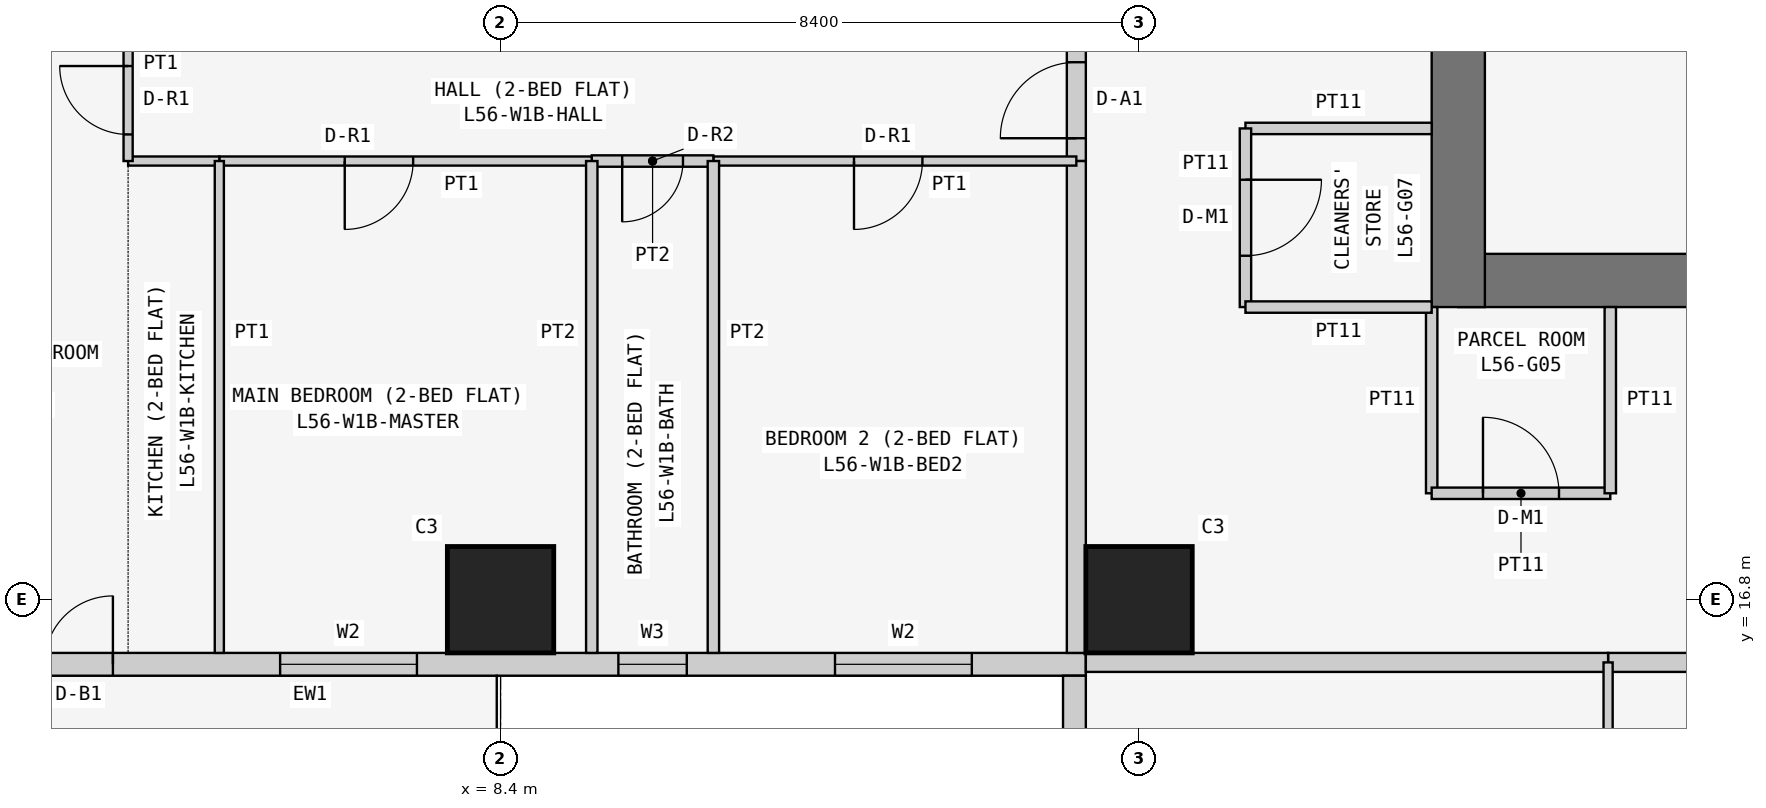
"""IFC4 building model, lengths in metres.
Left out: names, types, materials, properties, quantities, classifications, styles, units other than length and angle.
Written with IfcOpenShell. Run it as: python <this file> out.ifc"""

import sys

from ifc_helpers import new_model, si_unit, direction, frame, frame_2d, origin, origin_2d, place, context, subcontext, project, spatial, rectangle, extrude, element, fill, save


model = new_model("IFC4")
c1 = context("Model", 3, precision=1e-05, world=origin(), true_north=direction((0.0, 1.0)))
c2 = subcontext(c1, "Body", "Model", "MODEL_VIEW")
j1 = project(units=[si_unit("LENGTHUNIT", "METRE"), si_unit("PLANEANGLEUNIT", "RADIAN")], contexts=[c1])
p1 = place(None, origin())
s1 = spatial("IfcSite", under=j1, at=p1, CompositionType="ELEMENT")
p2 = place(p1, origin())
s2 = spatial("IfcBuilding", under=s1, at=p2, CompositionType="ELEMENT")
p3 = place(p2, frame((0.0, 0.0, 215.7)))
s3 = spatial("IfcBuildingStorey", under=s2, at=p3, CompositionType="ELEMENT", Elevation=215.7)
for number, where, z_axis, x_axis in (
    (1, (8.4, 16.8, 0.0), (0.0, 0.0, 1.0), (1.0, 0.0, 0.0)),
    (2, (16.8, 16.8, 0.0), (0.0, 0.0, 1.0), (1.0, 0.0, 0.0)),
):
    element("IfcColumn", number, at=place(p3, frame(where, z_axis=z_axis, x_axis=x_axis)), inside=s3, PredefinedType="COLUMN", context=c2, shape_type="SweptSolid", body=[
        extrude(rectangle(XDim=1.4, YDim=1.4, at=origin_2d()), origin(), (0.0, 0.0, 1.0), 3.6),
    ])
p4 = place(p3, frame((21.0, 21.0, 0.0), z_axis=(0.0, 0.0, 1.0), x_axis=(1.0, 0.0, 0.0)))
e3 = element("IfcWall", 3, at=p4, inside=s3, PredefinedType="SHEAR", context=c2, shape_type="SweptSolid", body=[
    extrude(rectangle(XDim=17.15, YDim=0.7, at=frame_2d((8.575, 0.0))), origin(), (0.0, 0.0, 1.0), 3.6),
])
p5 = place(p3, frame((21.0, 37.8, 0.0), z_axis=(0.0, 0.0, 1.0), x_axis=(0.0, -1.0, 0.0)))
e4 = element("IfcWall", 4, at=p5, inside=s3, PredefinedType="SHEAR", context=c2, shape_type="SweptSolid", body=[
    extrude(rectangle(XDim=17.15, YDim=0.7, at=frame_2d((8.575, 0.0))), origin(), (0.0, 0.0, 1.0), 3.6),
])
p6 = place(p5, frame((5.4, 0.0, 0.0)))
e5 = element("IfcOpeningElement", 5, at=p6, cuts=e4, PredefinedType="OPENING", context=c2, shape_type="SweptSolid", body=[
    extrude(rectangle(XDim=1.2, YDim=2.1, at=frame_2d((0.6, 1.05))), frame((0.0, 0.36, 0.0), z_axis=(0.0, -1.0, 0.0), x_axis=(1.0, 0.0, 0.0)), (0.0, 0.0, 1.0), 0.72),
])
p7 = place(p3, frame((0.4, 15.95, 0.0), z_axis=(0.0, 0.0, 1.0), x_axis=(1.0, 0.0, 0.0)))
e6 = element("IfcWall", 6, at=p7, inside=s3, PredefinedType="SOLIDWALL", context=c2, shape_type="SweptSolid", body=[
    extrude(rectangle(XDim=15.7, YDim=0.3, at=frame_2d((7.85, 0.0))), origin(), (0.0, 0.0, 1.0), 3.45),
])
p8 = place(p7, frame((12.4, 0.0, 0.9)))
e7 = element("IfcOpeningElement", 7, at=p8, cuts=e6, PredefinedType="OPENING", context=c2, shape_type="SweptSolid", body=[
    extrude(rectangle(XDim=1.8, YDim=1.5, at=frame_2d((0.9, 0.75))), frame((0.0, 0.16, 0.0), z_axis=(0.0, -1.0, 0.0), x_axis=(1.0, 0.0, 0.0)), (0.0, 0.0, 1.0), 0.32),
])
p9 = place(p7, frame((9.55, 0.0, 1.5)))
e8 = element("IfcOpeningElement", 8, at=p9, cuts=e6, PredefinedType="OPENING", context=c2, shape_type="SweptSolid", body=[
    extrude(rectangle(XDim=0.9, YDim=0.7, at=frame_2d((0.45, 0.35))), frame((0.0, 0.16, 0.0), z_axis=(0.0, -1.0, 0.0), x_axis=(1.0, 0.0, 0.0)), (0.0, 0.0, 1.0), 0.32),
])
p10 = place(p7, frame((5.1, 0.0, 0.9)))
e9 = element("IfcOpeningElement", 9, at=p10, cuts=e6, PredefinedType="OPENING", context=c2, shape_type="SweptSolid", body=[
    extrude(rectangle(XDim=1.8, YDim=1.5, at=frame_2d((0.9, 0.75))), frame((0.0, 0.16, 0.0), z_axis=(0.0, -1.0, 0.0), x_axis=(1.0, 0.0, 0.0)), (0.0, 0.0, 1.0), 0.32),
])
p11 = place(p7, frame((2.0, 0.0, 0.0)))
e10 = element("IfcOpeningElement", 10, at=p11, cuts=e6, PredefinedType="OPENING", context=c2, shape_type="SweptSolid", body=[
    extrude(rectangle(XDim=0.9, YDim=2.4, at=frame_2d((0.45, 1.2))), frame((0.0, 0.16, 0.0), z_axis=(0.0, -1.0, 0.0), x_axis=(1.0, 0.0, 0.0)), (0.0, 0.0, 1.0), 0.32),
])
p12 = place(p7, frame((0.7, 0.0, 0.9)))
e11 = element("IfcOpeningElement", 11, at=p12, cuts=e6, PredefinedType="OPENING", context=c2, shape_type="SweptSolid", body=[
    extrude(rectangle(XDim=1.2, YDim=1.5, at=frame_2d((0.6, 0.75))), frame((0.0, 0.16, 0.0), z_axis=(0.0, -1.0, 0.0), x_axis=(1.0, 0.0, 0.0)), (0.0, 0.0, 1.0), 0.32),
])
p13 = place(p3, frame((15.95, 15.8, 0.0), z_axis=(0.0, 0.0, 1.0), x_axis=(0.0, -1.0, 0.0)))
e12 = element("IfcWall", 12, at=p13, inside=s3, PredefinedType="SOLIDWALL", context=c2, shape_type="SweptSolid", body=[
    extrude(rectangle(XDim=7.0, YDim=0.3, at=frame_2d((3.5, 0.0))), origin(), (0.0, 0.0, 1.0), 3.45),
])
p14 = place(p13, frame((1.5, 0.0, 0.9)))
e13 = element("IfcOpeningElement", 13, at=p14, cuts=e12, PredefinedType="OPENING", context=c2, shape_type="SweptSolid", body=[
    extrude(rectangle(XDim=2.4, YDim=1.5, at=frame_2d((1.2, 0.75))), frame((0.0, 0.16, 0.0), z_axis=(0.0, -1.0, 0.0), x_axis=(1.0, 0.0, 0.0)), (0.0, 0.0, 1.0), 0.32),
])
p15 = place(p13, frame((5.05, 0.0, 0.9)))
e14 = element("IfcOpeningElement", 14, at=p15, cuts=e12, PredefinedType="OPENING", context=c2, shape_type="SweptSolid", body=[
    extrude(rectangle(XDim=1.2, YDim=1.5, at=frame_2d((0.6, 0.75))), frame((0.0, 0.16, 0.0), z_axis=(0.0, -1.0, 0.0), x_axis=(1.0, 0.0, 0.0)), (0.0, 0.0, 1.0), 0.32),
])
p16 = place(p3, frame((20.65, 20.65, 0.0), z_axis=(0.0, 0.0, 1.0), x_axis=(0.0, -1.0, 0.0)))
e15 = element("IfcWall", 15, at=p16, inside=s3, PredefinedType="PARTITIONING", context=c2, shape_type="SweptSolid", body=[
    extrude(rectangle(XDim=2.45, YDim=0.15, at=frame_2d((1.225, 0.0))), origin(), (0.0, 0.0, 1.0), 3.45),
])
p17 = place(p3, frame((20.65, 18.2, 0.0), z_axis=(0.0, 0.0, 1.0), x_axis=(1.0, 0.0, 0.0)))
e16 = element("IfcWall", 16, at=p17, inside=s3, PredefinedType="PARTITIONING", context=c2, shape_type="SweptSolid", body=[
    extrude(rectangle(XDim=2.35, YDim=0.15, at=frame_2d((1.175, 0.0))), origin(), (0.0, 0.0, 1.0), 3.45),
])
p18 = place(p17, frame((0.675, 0.0, 0.0)))
e17 = element("IfcOpeningElement", 17, at=p18, cuts=e16, PredefinedType="OPENING", context=c2, shape_type="SweptSolid", body=[
    extrude(rectangle(XDim=1.0, YDim=2.1, at=frame_2d((0.5, 1.05))), frame((0.0, 0.085, 0.0), z_axis=(0.0, -1.0, 0.0), x_axis=(1.0, 0.0, 0.0)), (0.0, 0.0, 1.0), 0.17),
])
for number, where, z_axis, x_axis in (
    (18, (23.0, 18.2, 0.0), (0.0, 0.0, 1.0), (0.0, 1.0, 0.0)),
    (19, (20.65, 23.0, 0.0), (0.0, 0.0, 1.0), (-1.0, 0.0, 0.0)),
):
    element("IfcWall", number, at=place(p3, frame(where, z_axis=z_axis, x_axis=x_axis)), inside=s3, PredefinedType="PARTITIONING", context=c2, shape_type="SweptSolid", body=[
        extrude(rectangle(XDim=2.45, YDim=0.15, at=frame_2d((1.225, 0.0))), origin(), (0.0, 0.0, 1.0), 3.45),
    ])
p19 = place(p3, frame((18.2, 23.0, 0.0), z_axis=(0.0, 0.0, 1.0), x_axis=(0.0, -1.0, 0.0)))
e20 = element("IfcWall", 20, at=p19, inside=s3, PredefinedType="PARTITIONING", context=c2, shape_type="SweptSolid", body=[
    extrude(rectangle(XDim=2.35, YDim=0.15, at=frame_2d((1.175, 0.0))), origin(), (0.0, 0.0, 1.0), 3.45),
])
p20 = place(p19, frame((0.675, 0.0, 0.0)))
e21 = element("IfcOpeningElement", 21, at=p20, cuts=e20, PredefinedType="OPENING", context=c2, shape_type="SweptSolid", body=[
    extrude(rectangle(XDim=1.0, YDim=2.1, at=frame_2d((0.5, 1.05))), frame((0.0, 0.085, 0.0), z_axis=(0.0, -1.0, 0.0), x_axis=(1.0, 0.0, 0.0)), (0.0, 0.0, 1.0), 0.17),
])
p21 = place(p3, frame((18.2, 20.65, 0.0), z_axis=(0.0, 0.0, 1.0), x_axis=(1.0, 0.0, 0.0)))
e22 = element("IfcWall", 22, at=p21, inside=s3, PredefinedType="PARTITIONING", context=c2, shape_type="SweptSolid", body=[
    extrude(rectangle(XDim=2.45, YDim=0.15, at=frame_2d((1.225, 0.0))), origin(), (0.0, 0.0, 1.0), 3.45),
])
p22 = place(p3, frame((29.4, 15.975, 0.0), z_axis=(0.0, 0.0, 1.0), x_axis=(-1.0, 0.0, 0.0)))
e23 = element("IfcWall", 23, at=p22, inside=s3, PredefinedType="PARTITIONING", context=c2, shape_type="SweptSolid", body=[
    extrude(rectangle(XDim=6.429, YDim=0.25, at=frame_2d((3.214, 0.0))), origin(), (0.0, 0.0, 1.0), 3.45),
])
p23 = place(p22, frame((0.5, 0.0, 0.0)))
e24 = element("IfcOpeningElement", 24, at=p23, cuts=e23, PredefinedType="OPENING", context=c2, shape_type="SweptSolid", body=[
    extrude(rectangle(XDim=1.0, YDim=2.1, at=frame_2d((0.5, 1.05))), frame((0.0, 0.135, 0.0), z_axis=(0.0, -1.0, 0.0), x_axis=(1.0, 0.0, 0.0)), (0.0, 0.0, 1.0), 0.27),
])
p24 = place(p3, frame((22.971, 15.975, 0.0), z_axis=(0.0, 0.0, 1.0), x_axis=(-1.0, 0.0, 0.0)))
e25 = element("IfcWall", 25, at=p24, inside=s3, PredefinedType="PARTITIONING", context=c2, shape_type="SweptSolid", body=[
    extrude(rectangle(XDim=6.871, YDim=0.25, at=frame_2d((3.436, 0.0))), origin(), (0.0, 0.0, 1.0), 3.45),
])
p25 = place(p3, frame((15.975, 22.571, 0.0), z_axis=(0.0, 0.0, 1.0), x_axis=(0.0, 1.0, 0.0)))
e26 = element("IfcWall", 26, at=p25, inside=s3, PredefinedType="PARTITIONING", context=c2, shape_type="SweptSolid", body=[
    extrude(rectangle(XDim=1.6, YDim=0.25, at=frame_2d((0.8, 0.0))), origin(), (0.0, 0.0, 1.0), 3.45),
])
p26 = place(p25, frame((0.3, 0.0, 0.0)))
e27 = element("IfcOpeningElement", 27, at=p26, cuts=e26, PredefinedType="OPENING", context=c2, shape_type="SweptSolid", body=[
    extrude(rectangle(XDim=1.0, YDim=2.1, at=frame_2d((0.5, 1.05))), frame((0.0, 0.135, 0.0), z_axis=(0.0, -1.0, 0.0), x_axis=(1.0, 0.0, 0.0)), (0.0, 0.0, 1.0), 0.27),
])
p27 = place(p3, frame((15.975, 16.1, 0.0), z_axis=(0.0, 0.0, 1.0), x_axis=(0.0, 1.0, 0.0)))
e28 = element("IfcWall", 28, at=p27, inside=s3, PredefinedType="PARTITIONING", context=c2, shape_type="SweptSolid", body=[
    extrude(rectangle(XDim=6.471, YDim=0.25, at=frame_2d((3.235, 0.0))), origin(), (0.0, 0.0, 1.0), 3.45),
])
p28 = place(p3, frame((22.971, 11.0, 0.0), z_axis=(0.0, 0.0, 1.0), x_axis=(0.0, 1.0, 0.0)))
e29 = element("IfcWall", 29, at=p28, inside=s3, PredefinedType="PARTITIONING", context=c2, shape_type="SweptSolid", body=[
    extrude(rectangle(XDim=4.975, YDim=0.12, at=frame_2d((2.488, 0.0))), origin(), (0.0, 0.0, 1.0), 3.45),
])
p29 = place(p28, frame((1.85, 0.0, 0.0)))
e30 = element("IfcOpeningElement", 30, at=p29, cuts=e29, PredefinedType="OPENING", context=c2, shape_type="SweptSolid", body=[
    extrude(rectangle(XDim=0.9, YDim=2.1, at=frame_2d((0.45, 1.05))), frame((0.0, 0.07, 0.0), z_axis=(0.0, -1.0, 0.0), x_axis=(1.0, 0.0, 0.0)), (0.0, 0.0, 1.0), 0.14),
])
p30 = place(p3, frame((11.2, 22.571, 0.0), z_axis=(0.0, 0.0, 1.0), x_axis=(1.0, 0.0, 0.0)))
e31 = element("IfcWall", 31, at=p30, inside=s3, PredefinedType="PARTITIONING", context=c2, shape_type="SweptSolid", body=[
    extrude(rectangle(XDim=4.775, YDim=0.12, at=frame_2d((2.388, 0.0))), origin(), (0.0, 0.0, 1.0), 3.45),
])
p31 = place(p30, frame((1.85, 0.0, 0.0)))
e32 = element("IfcOpeningElement", 32, at=p31, cuts=e31, PredefinedType="OPENING", context=c2, shape_type="SweptSolid", body=[
    extrude(rectangle(XDim=0.9, YDim=2.1, at=frame_2d((0.45, 1.05))), frame((0.0, 0.07, 0.0), z_axis=(0.0, -1.0, 0.0), x_axis=(1.0, 0.0, 0.0)), (0.0, 0.0, 1.0), 0.14),
])
p32 = place(p3, frame((9.6, 22.571, 0.0), z_axis=(0.0, 0.0, 1.0), x_axis=(1.0, 0.0, 0.0)))
e33 = element("IfcWall", 33, at=p32, inside=s3, PredefinedType="PARTITIONING", context=c2, shape_type="SweptSolid", body=[
    extrude(rectangle(XDim=1.6, YDim=0.15, at=frame_2d((0.8, 0.0))), origin(), (0.0, 0.0, 1.0), 3.45),
])
p33 = place(p32, frame((0.4, 0.0, 0.0)))
e34 = element("IfcOpeningElement", 34, at=p33, cuts=e33, PredefinedType="OPENING", context=c2, shape_type="SweptSolid", body=[
    extrude(rectangle(XDim=0.8, YDim=2.1, at=frame_2d((0.4, 1.05))), frame((0.0, 0.085, 0.0), z_axis=(0.0, -1.0, 0.0), x_axis=(1.0, 0.0, 0.0)), (0.0, 0.0, 1.0), 0.17),
])
p34 = place(p3, frame((4.7, 22.571, 0.0), z_axis=(0.0, 0.0, 1.0), x_axis=(1.0, 0.0, 0.0)))
e35 = element("IfcWall", 35, at=p34, inside=s3, PredefinedType="PARTITIONING", context=c2, shape_type="SweptSolid", body=[
    extrude(rectangle(XDim=4.9, YDim=0.12, at=frame_2d((2.45, 0.0))), origin(), (0.0, 0.0, 1.0), 3.45),
])
p35 = place(p34, frame((1.65, 0.0, 0.0)))
e36 = element("IfcOpeningElement", 36, at=p35, cuts=e35, PredefinedType="OPENING", context=c2, shape_type="SweptSolid", body=[
    extrude(rectangle(XDim=0.9, YDim=2.1, at=frame_2d((0.45, 1.05))), frame((0.0, 0.07, 0.0), z_axis=(0.0, -1.0, 0.0), x_axis=(1.0, 0.0, 0.0)), (0.0, 0.0, 1.0), 0.14),
])
p36 = place(p3, frame((3.5, 22.571, 0.0), z_axis=(0.0, 0.0, 1.0), x_axis=(1.0, 0.0, 0.0)))
e37 = element("IfcWall", 37, at=p36, inside=s3, PredefinedType="PARTITIONING", context=c2, shape_type="SweptSolid", body=[
    extrude(rectangle(XDim=1.2, YDim=0.12, at=frame_2d((0.6, 0.0))), origin(), (0.0, 0.0, 1.0), 3.45),
])
p37 = place(p3, frame((3.5, 24.171, 0.0), z_axis=(0.0, 0.0, 1.0), x_axis=(0.0, -1.0, 0.0)))
e38 = element("IfcWall", 38, at=p37, inside=s3, PredefinedType="PARTITIONING", context=c2, shape_type="SweptSolid", body=[
    extrude(rectangle(XDim=1.6, YDim=0.12, at=frame_2d((0.8, 0.0))), origin(), (0.0, 0.0, 1.0), 3.45),
])
p38 = place(p37, frame((0.35, 0.0, 0.0)))
e39 = element("IfcOpeningElement", 39, at=p38, cuts=e38, PredefinedType="OPENING", context=c2, shape_type="SweptSolid", body=[
    extrude(rectangle(XDim=0.9, YDim=2.1, at=frame_2d((0.45, 1.05))), frame((0.0, 0.07, 0.0), z_axis=(0.0, -1.0, 0.0), x_axis=(1.0, 0.0, 0.0)), (0.0, 0.0, 1.0), 0.14),
])
for number, where, z_axis, x_axis in (
    (40, (11.2, 22.571, 0.0), (0.0, 0.0, 1.0), (0.0, -1.0, 0.0)),
    (41, (9.6, 22.571, 0.0), (0.0, 0.0, 1.0), (0.0, -1.0, 0.0)),
):
    element("IfcWall", number, at=place(p3, frame(where, z_axis=z_axis, x_axis=x_axis)), inside=s3, PredefinedType="PARTITIONING", context=c2, shape_type="SweptSolid", body=[
        extrude(rectangle(XDim=6.471, YDim=0.15, at=frame_2d((3.235, 0.0))), origin(), (0.0, 0.0, 1.0), 3.45),
    ])
p39 = place(p3, frame((4.7, 22.571, 0.0), z_axis=(0.0, 0.0, 1.0), x_axis=(0.0, -1.0, 0.0)))
e42 = element("IfcWall", 42, at=p39, inside=s3, PredefinedType="PARTITIONING", context=c2, shape_type="SweptSolid", body=[
    extrude(rectangle(XDim=6.471, YDim=0.12, at=frame_2d((3.235, 0.0))), origin(), (0.0, 0.0, 1.0), 3.45),
])
p40 = place(p8, origin())
e43 = element("IfcWindow", 43, at=p40, inside=s3, PartitioningType="SINGLE_PANEL", PredefinedType="WINDOW", context=c2, shape_type="SweptSolid", body=[
    extrude(rectangle(XDim=1.8, YDim=1.5, at=frame_2d((0.9, 0.75))), frame((0.0, 0.03, 0.0), z_axis=(0.0, -1.0, 0.0), x_axis=(1.0, 0.0, 0.0)), (0.0, 0.0, 1.0), 0.06),
])
fill(e7, e43)
p41 = place(p9, origin())
e44 = element("IfcWindow", 44, at=p41, inside=s3, PartitioningType="SINGLE_PANEL", PredefinedType="WINDOW", context=c2, shape_type="SweptSolid", body=[
    extrude(rectangle(XDim=0.9, YDim=0.7, at=frame_2d((0.45, 0.35))), frame((0.0, 0.03, 0.0), z_axis=(0.0, -1.0, 0.0), x_axis=(1.0, 0.0, 0.0)), (0.0, 0.0, 1.0), 0.06),
])
fill(e8, e44)
p42 = place(p10, origin())
e45 = element("IfcWindow", 45, at=p42, inside=s3, PartitioningType="SINGLE_PANEL", PredefinedType="WINDOW", context=c2, shape_type="SweptSolid", body=[
    extrude(rectangle(XDim=1.8, YDim=1.5, at=frame_2d((0.9, 0.75))), frame((0.0, 0.03, 0.0), z_axis=(0.0, -1.0, 0.0), x_axis=(1.0, 0.0, 0.0)), (0.0, 0.0, 1.0), 0.06),
])
fill(e9, e45)
p43 = place(p11, origin())
e46 = element("IfcDoor", 46, at=p43, inside=s3, OperationType="SINGLE_SWING_RIGHT", PredefinedType="DOOR", context=c2, shape_type="SweptSolid", body=[
    extrude(rectangle(XDim=0.9, YDim=2.4, at=frame_2d((0.45, 1.2))), frame((0.0, 0.025, 0.0), z_axis=(0.0, -1.0, 0.0), x_axis=(1.0, 0.0, 0.0)), (0.0, 0.0, 1.0), 0.05),
])
fill(e10, e46)
p44 = place(p18, origin())
e47 = element("IfcDoor", 47, at=p44, inside=s3, OperationType="SINGLE_SWING_LEFT", PredefinedType="DOOR", context=c2, shape_type="SweptSolid", body=[
    extrude(rectangle(XDim=1.0, YDim=2.1, at=frame_2d((0.5, 1.05))), frame((0.0, 0.025, 0.0), z_axis=(0.0, -1.0, 0.0), x_axis=(1.0, 0.0, 0.0)), (0.0, 0.0, 1.0), 0.05),
])
fill(e17, e47)
p45 = place(p20, origin())
e48 = element("IfcDoor", 48, at=p45, inside=s3, OperationType="SINGLE_SWING_LEFT", PredefinedType="DOOR", context=c2, shape_type="SweptSolid", body=[
    extrude(rectangle(XDim=1.0, YDim=2.1, at=frame_2d((0.5, 1.05))), frame((0.0, 0.025, 0.0), z_axis=(0.0, -1.0, 0.0), x_axis=(1.0, 0.0, 0.0)), (0.0, 0.0, 1.0), 0.05),
])
fill(e21, e48)
p46 = place(p26, origin())
e49 = element("IfcDoor", 49, at=p46, inside=s3, OperationType="SINGLE_SWING_LEFT", PredefinedType="DOOR", context=c2, shape_type="SweptSolid", body=[
    extrude(rectangle(XDim=1.0, YDim=2.1, at=frame_2d((0.5, 1.05))), frame((0.0, 0.025, 0.0), z_axis=(0.0, -1.0, 0.0), x_axis=(1.0, 0.0, 0.0)), (0.0, 0.0, 1.0), 0.05),
])
fill(e27, e49)
p47 = place(p31, frame((0.9, 0.0, 0.0), z_axis=(0.0, 0.0, 1.0), x_axis=(-1.0, 0.0, 0.0)))
e50 = element("IfcDoor", 50, at=p47, inside=s3, OperationType="SINGLE_SWING_RIGHT", PredefinedType="DOOR", context=c2, shape_type="SweptSolid", body=[
    extrude(rectangle(XDim=0.9, YDim=2.1, at=frame_2d((0.45, 1.05))), frame((0.0, 0.025, 0.0), z_axis=(0.0, -1.0, 0.0), x_axis=(1.0, 0.0, 0.0)), (0.0, 0.0, 1.0), 0.05),
])
fill(e32, e50)
p48 = place(p33, frame((0.8, 0.0, 0.0), z_axis=(0.0, 0.0, 1.0), x_axis=(-1.0, 0.0, 0.0)))
e51 = element("IfcDoor", 51, at=p48, inside=s3, OperationType="SINGLE_SWING_RIGHT", PredefinedType="DOOR", context=c2, shape_type="SweptSolid", body=[
    extrude(rectangle(XDim=0.8, YDim=2.1, at=frame_2d((0.4, 1.05))), frame((0.0, 0.025, 0.0), z_axis=(0.0, -1.0, 0.0), x_axis=(1.0, 0.0, 0.0)), (0.0, 0.0, 1.0), 0.05),
])
fill(e34, e51)
p49 = place(p35, frame((0.9, 0.0, 0.0), z_axis=(0.0, 0.0, 1.0), x_axis=(-1.0, 0.0, 0.0)))
e52 = element("IfcDoor", 52, at=p49, inside=s3, OperationType="SINGLE_SWING_RIGHT", PredefinedType="DOOR", context=c2, shape_type="SweptSolid", body=[
    extrude(rectangle(XDim=0.9, YDim=2.1, at=frame_2d((0.45, 1.05))), frame((0.0, 0.025, 0.0), z_axis=(0.0, -1.0, 0.0), x_axis=(1.0, 0.0, 0.0)), (0.0, 0.0, 1.0), 0.05),
])
fill(e36, e52)
p50 = place(p38, frame((0.9, 0.0, 0.0), z_axis=(0.0, 0.0, 1.0), x_axis=(-1.0, 0.0, 0.0)))
e53 = element("IfcDoor", 53, at=p50, inside=s3, OperationType="SINGLE_SWING_RIGHT", PredefinedType="DOOR", context=c2, shape_type="SweptSolid", body=[
    extrude(rectangle(XDim=0.9, YDim=2.1, at=frame_2d((0.45, 1.05))), frame((0.0, 0.025, 0.0), z_axis=(0.0, -1.0, 0.0), x_axis=(1.0, 0.0, 0.0)), (0.0, 0.0, 1.0), 0.05),
])
fill(e39, e53)
save(model, sys.argv[1])
